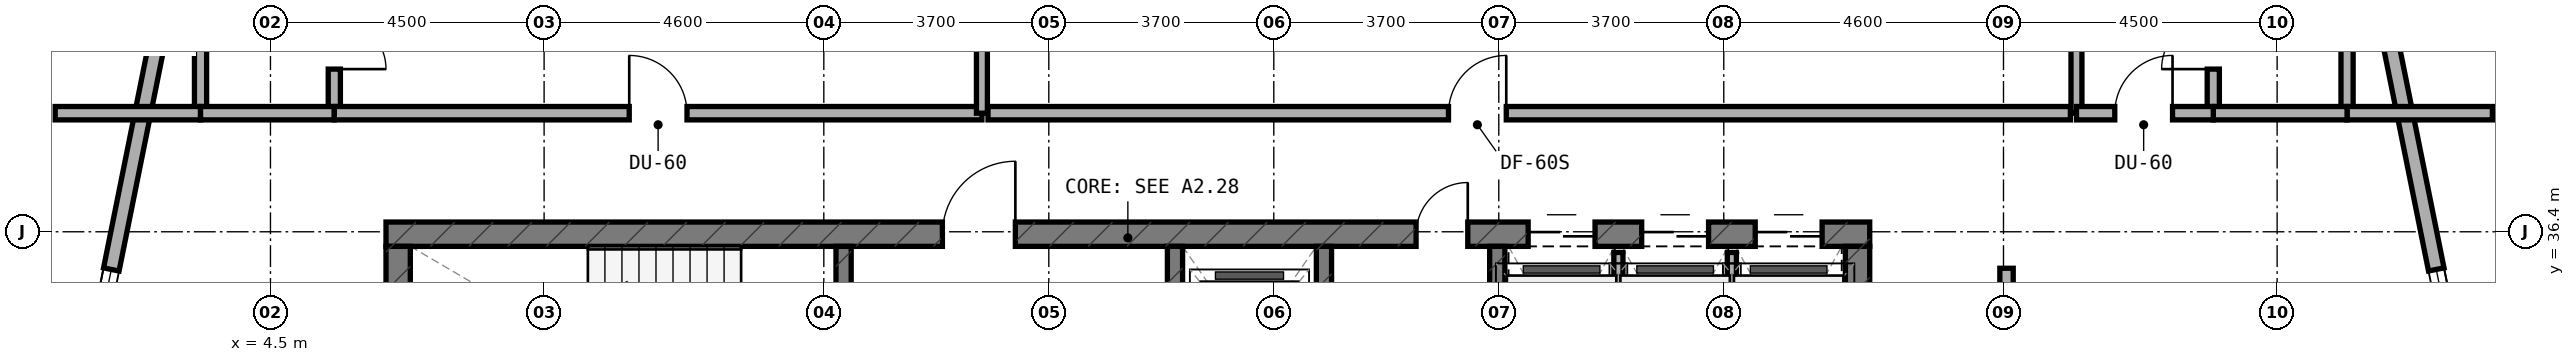
"""IFC4 building model, lengths in metres.
Left out: names, types, materials, properties, quantities, classifications, styles, units other than length and angle.
Written with IfcOpenShell. Run it as: python <this file> out.ifc"""

import sys

from ifc_helpers import new_model, si_unit, direction, frame, frame_2d, origin, place, context, subcontext, project, spatial, rectangle, extrude, element, fill, save


model = new_model("IFC4")
c1 = context("Model", 3, precision=1e-05, world=origin(), true_north=direction((0.0, 1.0)))
c2 = subcontext(c1, "Body", "Model", "MODEL_VIEW")
j1 = project(units=[si_unit("LENGTHUNIT", "METRE"), si_unit("PLANEANGLEUNIT", "RADIAN")], contexts=[c1])
p1 = place(None, origin())
s1 = spatial("IfcSite", under=j1, at=p1, CompositionType="ELEMENT")
p2 = place(p1, origin())
s2 = spatial("IfcBuilding", under=s1, at=p2, CompositionType="ELEMENT")
p3 = place(p2, frame((0.0, 0.0, 124.0)))
s3 = spatial("IfcBuildingStorey", under=s2, at=p3, CompositionType="ELEMENT", Elevation=124.0)
p4 = place(p3, frame((6.4, 36.36, 0.0), z_axis=(0.0, 0.0, 1.0), x_axis=(1.0, 0.0, 0.0)))
e1 = element("IfcWall", 1, at=p4, inside=s3, PredefinedType="SHEAR", context=c2, shape_type="SweptSolid", body=[
    extrude(rectangle(XDim=24.4, YDim=0.4, at=frame_2d((12.2, 0.0))), origin(), (0.0, 0.0, 1.0), 3.5),
])
p5 = place(p4, frame((9.15, 0.0, 0.0)))
e2 = element("IfcOpeningElement", 2, at=p5, cuts=e1, PredefinedType="OPENING", context=c2, shape_type="SweptSolid", body=[
    extrude(rectangle(XDim=1.2, YDim=2.15, at=frame_2d((0.6, 1.075))), frame((0.0, 0.21, 0.0), z_axis=(0.0, -1.0, 0.0), x_axis=(1.0, 0.0, 0.0)), (0.0, 0.0, 1.0), 0.42),
])
p6 = place(p4, frame((16.94, 0.0, 0.0)))
e3 = element("IfcOpeningElement", 3, at=p6, cuts=e1, PredefinedType="OPENING", context=c2, shape_type="SweptSolid", body=[
    extrude(rectangle(XDim=0.85, YDim=2.1, at=frame_2d((0.425, 1.05))), frame((0.0, 0.21, 0.0), z_axis=(0.0, -1.0, 0.0), x_axis=(1.0, 0.0, 0.0)), (0.0, 0.0, 1.0), 0.42),
])
p7 = place(p4, frame((18.783, 0.0, 0.0)))
e4 = element("IfcOpeningElement", 4, at=p7, cuts=e1, PredefinedType="OPENING", context=c2, shape_type="SweptSolid", body=[
    extrude(rectangle(XDim=1.1, YDim=2.15, at=frame_2d((0.55, 1.075))), frame((0.0, 0.21, 0.0), z_axis=(0.0, -1.0, 0.0), x_axis=(1.0, 0.0, 0.0)), (0.0, 0.0, 1.0), 0.42),
])
p8 = place(p4, frame((20.65, 0.0, 0.0)))
e5 = element("IfcOpeningElement", 5, at=p8, cuts=e1, PredefinedType="OPENING", context=c2, shape_type="SweptSolid", body=[
    extrude(rectangle(XDim=1.1, YDim=2.15, at=frame_2d((0.55, 1.075))), frame((0.0, 0.21, 0.0), z_axis=(0.0, -1.0, 0.0), x_axis=(1.0, 0.0, 0.0)), (0.0, 0.0, 1.0), 0.42),
])
p9 = place(p4, frame((22.517, 0.0, 0.0)))
e6 = element("IfcOpeningElement", 6, at=p9, cuts=e1, PredefinedType="OPENING", context=c2, shape_type="SweptSolid", body=[
    extrude(rectangle(XDim=1.1, YDim=2.15, at=frame_2d((0.55, 1.075))), frame((0.0, 0.21, 0.0), z_axis=(0.0, -1.0, 0.0), x_axis=(1.0, 0.0, 0.0)), (0.0, 0.0, 1.0), 0.42),
])
for number, where, z_axis, x_axis in (
    (7, (6.6, 33.0, 0.0), (0.0, 0.0, 1.0), (0.0, 1.0, 0.0)),
    (8, (30.6, 33.0, 0.0), (0.0, 0.0, 1.0), (0.0, 1.0, 0.0)),
):
    element("IfcWall", number, at=place(p3, frame(where, z_axis=z_axis, x_axis=x_axis)), inside=s3, PredefinedType="SHEAR", context=c2, shape_type="SweptSolid", body=[
        extrude(rectangle(XDim=3.16, YDim=0.4, at=frame_2d((1.58, 0.0))), origin(), (0.0, 0.0, 1.0), 3.5),
    ])
p10 = place(p3, frame((13.925, 33.0, 0.0), z_axis=(0.0, 0.0, 1.0), x_axis=(0.0, 1.0, 0.0)))
e9 = element("IfcWall", 9, at=p10, inside=s3, PredefinedType="STANDARD", context=c2, shape_type="SweptSolid", body=[
    extrude(rectangle(XDim=3.16, YDim=0.25, at=frame_2d((1.58, 0.0))), origin(), (0.0, 0.0, 1.0), 3.22),
])
p11 = place(p10, frame((0.98, 0.0, 0.0)))
e10 = element("IfcOpeningElement", 10, at=p11, cuts=e9, PredefinedType="OPENING", context=c2, shape_type="SweptSolid", body=[
    extrude(rectangle(XDim=1.1, YDim=2.15, at=frame_2d((0.55, 1.075))), frame((0.0, 0.135, 0.0), z_axis=(0.0, -1.0, 0.0), x_axis=(1.0, 0.0, 0.0)), (0.0, 0.0, 1.0), 0.27),
])
p12 = place(p3, frame((19.375, 33.0, 0.0), z_axis=(0.0, 0.0, 1.0), x_axis=(0.0, 1.0, 0.0)))
e11 = element("IfcWall", 11, at=p12, inside=s3, PredefinedType="STANDARD", context=c2, shape_type="SweptSolid", body=[
    extrude(rectangle(XDim=3.16, YDim=0.25, at=frame_2d((1.58, 0.0))), origin(), (0.0, 0.0, 1.0), 3.22),
])
p13 = place(p12, frame((0.98, 0.0, 0.0)))
e12 = element("IfcOpeningElement", 12, at=p13, cuts=e11, PredefinedType="OPENING", context=c2, shape_type="SweptSolid", body=[
    extrude(rectangle(XDim=1.1, YDim=2.15, at=frame_2d((0.55, 1.075))), frame((0.0, 0.135, 0.0), z_axis=(0.0, -1.0, 0.0), x_axis=(1.0, 0.0, 0.0)), (0.0, 0.0, 1.0), 0.27),
])
for number, where, z_axis, x_axis in (
    (13, (21.825, 33.0, 0.0), (0.0, 0.0, 1.0), (0.0, 1.0, 0.0)),
    (14, (24.675, 33.0, 0.0), (0.0, 0.0, 1.0), (0.0, 1.0, 0.0)),
):
    element("IfcWall", number, at=place(p3, frame(where, z_axis=z_axis, x_axis=x_axis)), inside=s3, PredefinedType="STANDARD", context=c2, shape_type="SweptSolid", body=[
        extrude(rectangle(XDim=3.16, YDim=0.25, at=frame_2d((1.58, 0.0))), origin(), (0.0, 0.0, 1.0), 3.22),
    ])
p14 = place(p3, frame((41.084, 30.98, 0.0), z_axis=(0.0, 0.0, 1.0), x_axis=(-0.197435082048, 0.980315963543, 0.0)))
e15 = element("IfcWall", 15, at=p14, inside=s3, PredefinedType="STANDARD", context=c2, shape_type="SweptSolid", body=[
    extrude(rectangle(XDim=9.183, YDim=0.26, at=frame_2d((4.591, 0.0))), origin(), (0.0, 0.0, 1.0), 3.22),
])
p15 = place(p14, frame((2.497, 0.0, 0.8)))
e16 = element("IfcOpeningElement", 16, at=p15, cuts=e15, PredefinedType="OPENING", context=c2, shape_type="SweptSolid", body=[
    extrude(rectangle(XDim=2.4, YDim=1.6, at=frame_2d((1.2, 0.8))), frame((0.0, 0.14, 0.0), z_axis=(0.0, -1.0, 0.0), x_axis=(1.0, 0.0, 0.0)), (0.0, 0.0, 1.0), 0.28),
])
p16 = place(p3, frame((2.729, 39.982, 0.0), z_axis=(0.0, 0.0, 1.0), x_axis=(-0.197435082048, -0.980315963543, 0.0)))
e17 = element("IfcWall", 17, at=p16, inside=s3, PredefinedType="STANDARD", context=c2, shape_type="SweptSolid", body=[
    extrude(rectangle(XDim=9.183, YDim=0.26, at=frame_2d((4.591, 0.0))), origin(), (0.0, 0.0, 1.0), 3.22),
])
p17 = place(p16, frame((4.286, 0.0, 0.8)))
e18 = element("IfcOpeningElement", 18, at=p17, cuts=e17, PredefinedType="OPENING", context=c2, shape_type="SweptSolid", body=[
    extrude(rectangle(XDim=2.4, YDim=1.6, at=frame_2d((1.2, 0.8))), frame((0.0, 0.14, 0.0), z_axis=(0.0, -1.0, 0.0), x_axis=(1.0, 0.0, 0.0)), (0.0, 0.0, 1.0), 0.28),
])
p18 = place(p3, frame((26.667, 33.1, 0.0), z_axis=(0.0, 0.0, 1.0), x_axis=(0.0, 1.0, 0.0)))
e19 = element("IfcWall", 19, at=p18, inside=s3, PredefinedType="PARTITIONING", context=c2, shape_type="SweptSolid", body=[
    extrude(rectangle(XDim=2.96, YDim=0.15, at=frame_2d((1.48, 0.0))), origin(), (0.0, 0.0, 1.0), 3.22),
])
p19 = place(p3, frame((28.533, 33.1, 0.0), z_axis=(0.0, 0.0, 1.0), x_axis=(0.0, 1.0, 0.0)))
e20 = element("IfcWall", 20, at=p19, inside=s3, PredefinedType="PARTITIONING", context=c2, shape_type="SweptSolid", body=[
    extrude(rectangle(XDim=2.96, YDim=0.15, at=frame_2d((1.48, 0.0))), origin(), (0.0, 0.0, 1.0), 2.695),
])
p20 = place(p3, frame((5.55, 38.45, 0.0), z_axis=(0.0, 0.0, 1.0), x_axis=(0.0, 1.0, 0.0)))
e21 = element("IfcWall", 21, at=p20, inside=s3, PredefinedType="PLUMBINGWALL", context=c2, shape_type="SweptSolid", body=[
    extrude(rectangle(XDim=2.1, YDim=0.2, at=frame_2d((1.05, 0.0))), origin(), (0.0, 0.0, 1.0), 3.22),
])
p21 = place(p20, frame((0.625, 0.0, 0.0)))
e22 = element("IfcOpeningElement", 22, at=p21, cuts=e21, PredefinedType="OPENING", context=c2, shape_type="SweptSolid", body=[
    extrude(rectangle(XDim=0.85, YDim=2.1, at=frame_2d((0.425, 1.05))), frame((0.0, 0.11, 0.0), z_axis=(0.0, -1.0, 0.0), x_axis=(1.0, 0.0, 0.0)), (0.0, 0.0, 1.0), 0.22),
])
p22 = place(p3, frame((3.35, 38.45, 0.0), z_axis=(0.0, 0.0, 1.0), x_axis=(0.0, 1.0, 0.0)))
e23 = element("IfcWall", 23, at=p22, inside=s3, PredefinedType="PLUMBINGWALL", context=c2, shape_type="SweptSolid", body=[
    extrude(rectangle(XDim=2.1, YDim=0.2, at=frame_2d((1.05, 0.0))), origin(), (0.0, 0.0, 1.0), 3.22),
])
p23 = place(p3, frame((0.96, 38.35, 0.0), z_axis=(0.0, 0.0, 1.0), x_axis=(1.0, 0.0, 0.0)))
e24 = element("IfcWall", 24, at=p23, inside=s3, PredefinedType="SOLIDWALL", context=c2, shape_type="SweptSolid", body=[
    extrude(rectangle(XDim=2.39, YDim=0.22, at=frame_2d((1.195, 0.0))), origin(), (0.0, 0.0, 1.0), 3.22),
])
p24 = place(p3, frame((3.35, 38.35, 0.0), z_axis=(0.0, 0.0, 1.0), x_axis=(1.0, 0.0, 0.0)))
e25 = element("IfcWall", 25, at=p24, inside=s3, PredefinedType="SOLIDWALL", context=c2, shape_type="SweptSolid", body=[
    extrude(rectangle(XDim=2.2, YDim=0.22, at=frame_2d((1.1, 0.0))), origin(), (0.0, 0.0, 1.0), 3.22),
])
p25 = place(p3, frame((5.55, 38.35, 0.0), z_axis=(0.0, 0.0, 1.0), x_axis=(1.0, 0.0, 0.0)))
e26 = element("IfcWall", 26, at=p25, inside=s3, PredefinedType="SOLIDWALL", context=c2, shape_type="SweptSolid", body=[
    extrude(rectangle(XDim=10.65, YDim=0.22, at=frame_2d((5.325, 0.0))), origin(), (0.0, 0.0, 1.0), 2.695),
])
p26 = place(p25, frame((4.85, 0.0, 0.0)))
e27 = element("IfcOpeningElement", 27, at=p26, cuts=e26, PredefinedType="OPENING", context=c2, shape_type="SweptSolid", body=[
    extrude(rectangle(XDim=0.95, YDim=2.1, at=frame_2d((0.475, 1.05))), frame((0.0, 0.12, 0.0), z_axis=(0.0, -1.0, 0.0), x_axis=(1.0, 0.0, 0.0)), (0.0, 0.0, 1.0), 0.24),
])
p27 = place(p3, frame((16.2, 38.35, 0.0), z_axis=(0.0, 0.0, 1.0), x_axis=(0.0, 1.0, 0.0)))
e28 = element("IfcWall", 28, at=p27, inside=s3, PredefinedType="SOLIDWALL", context=c2, shape_type="SweptSolid", body=[
    extrude(rectangle(XDim=6.79, YDim=0.18, at=frame_2d((3.395, 0.0))), origin(), (0.0, 0.0, 1.0), 2.695),
])
p28 = place(p3, frame((16.3, 38.35, 0.0), z_axis=(0.0, 0.0, 1.0), x_axis=(1.0, 0.0, 0.0)))
e29 = element("IfcWall", 29, at=p28, inside=s3, PredefinedType="SOLIDWALL", context=c2, shape_type="SweptSolid", body=[
    extrude(rectangle(XDim=17.8, YDim=0.22, at=frame_2d((8.9, 0.0))), origin(), (0.0, 0.0, 1.0), 2.695),
])
p29 = place(p28, frame((7.573, 0.0, 0.0)))
e30 = element("IfcOpeningElement", 30, at=p29, cuts=e29, PredefinedType="OPENING", context=c2, shape_type="SweptSolid", body=[
    extrude(rectangle(XDim=0.95, YDim=2.1, at=frame_2d((0.475, 1.05))), frame((0.0, 0.12, 0.0), z_axis=(0.0, -1.0, 0.0), x_axis=(1.0, 0.0, 0.0)), (0.0, 0.0, 1.0), 0.24),
])
p30 = place(p3, frame((34.2, 38.35, 0.0), z_axis=(0.0, 0.0, 1.0), x_axis=(0.0, 1.0, 0.0)))
e31 = element("IfcWall", 31, at=p30, inside=s3, PredefinedType="SOLIDWALL", context=c2, shape_type="SweptSolid", body=[
    extrude(rectangle(XDim=5.351, YDim=0.18, at=frame_2d((2.675, 0.0))), origin(), (0.0, 0.0, 1.0), 2.695),
])
p31 = place(p3, frame((36.45, 38.45, 0.0), z_axis=(0.0, 0.0, 1.0), x_axis=(0.0, 1.0, 0.0)))
e32 = element("IfcWall", 32, at=p31, inside=s3, PredefinedType="PLUMBINGWALL", context=c2, shape_type="SweptSolid", body=[
    extrude(rectangle(XDim=2.1, YDim=0.2, at=frame_2d((1.05, 0.0))), origin(), (0.0, 0.0, 1.0), 3.22),
])
p32 = place(p31, frame((0.625, 0.0, 0.0)))
e33 = element("IfcOpeningElement", 33, at=p32, cuts=e32, PredefinedType="OPENING", context=c2, shape_type="SweptSolid", body=[
    extrude(rectangle(XDim=0.85, YDim=2.1, at=frame_2d((0.425, 1.05))), frame((0.0, 0.11, 0.0), z_axis=(0.0, -1.0, 0.0), x_axis=(1.0, 0.0, 0.0)), (0.0, 0.0, 1.0), 0.22),
])
p33 = place(p3, frame((38.65, 38.45, 0.0), z_axis=(0.0, 0.0, 1.0), x_axis=(0.0, 1.0, 0.0)))
e34 = element("IfcWall", 34, at=p33, inside=s3, PredefinedType="PLUMBINGWALL", context=c2, shape_type="SweptSolid", body=[
    extrude(rectangle(XDim=2.1, YDim=0.2, at=frame_2d((1.05, 0.0))), origin(), (0.0, 0.0, 1.0), 3.22),
])
p34 = place(p3, frame((38.65, 38.35, 0.0), z_axis=(0.0, 0.0, 1.0), x_axis=(1.0, 0.0, 0.0)))
e35 = element("IfcWall", 35, at=p34, inside=s3, PredefinedType="SOLIDWALL", context=c2, shape_type="SweptSolid", body=[
    extrude(rectangle(XDim=2.39, YDim=0.22, at=frame_2d((1.195, 0.0))), origin(), (0.0, 0.0, 1.0), 3.22),
])
p35 = place(p3, frame((36.45, 38.35, 0.0), z_axis=(0.0, 0.0, 1.0), x_axis=(1.0, 0.0, 0.0)))
e36 = element("IfcWall", 36, at=p35, inside=s3, PredefinedType="SOLIDWALL", context=c2, shape_type="SweptSolid", body=[
    extrude(rectangle(XDim=2.2, YDim=0.22, at=frame_2d((1.1, 0.0))), origin(), (0.0, 0.0, 1.0), 3.22),
])
p36 = place(p3, frame((34.2, 38.35, 0.0), z_axis=(0.0, 0.0, 1.0), x_axis=(1.0, 0.0, 0.0)))
e37 = element("IfcWall", 37, at=p36, inside=s3, PredefinedType="SOLIDWALL", context=c2, shape_type="SweptSolid", body=[
    extrude(rectangle(XDim=2.25, YDim=0.22, at=frame_2d((1.125, 0.0))), origin(), (0.0, 0.0, 1.0), 2.695),
])
p37 = place(p36, frame((0.63, 0.0, 0.0)))
e38 = element("IfcOpeningElement", 38, at=p37, cuts=e37, PredefinedType="OPENING", context=c2, shape_type="SweptSolid", body=[
    extrude(rectangle(XDim=0.95, YDim=2.1, at=frame_2d((0.475, 1.05))), frame((0.0, 0.12, 0.0), z_axis=(0.0, -1.0, 0.0), x_axis=(1.0, 0.0, 0.0)), (0.0, 0.0, 1.0), 0.24),
])
p38 = place(p3, frame((33.05, 30.593, 0.0), z_axis=(0.0, 0.0, 1.0), x_axis=(0.0, 1.0, 0.0)))
e39 = element("IfcWall", 39, at=p38, inside=s3, PredefinedType="SOLIDWALL", context=c2, shape_type="SweptSolid", body=[
    extrude(rectangle(XDim=5.207, YDim=0.22, at=frame_2d((2.604, 0.0))), origin(), (0.0, 0.0, 1.0), 2.695),
])
p39 = place(p38, frame((2.128, 0.0, 0.0)))
e40 = element("IfcOpeningElement", 40, at=p39, cuts=e39, PredefinedType="OPENING", context=c2, shape_type="SweptSolid", body=[
    extrude(rectangle(XDim=0.95, YDim=2.1, at=frame_2d((0.475, 1.05))), frame((0.0, 0.12, 0.0), z_axis=(0.0, -1.0, 0.0), x_axis=(1.0, 0.0, 0.0)), (0.0, 0.0, 1.0), 0.24),
])
p40 = place(p15, origin())
e41 = element("IfcWindow", 41, at=p40, inside=s3, PartitioningType="SINGLE_PANEL", PredefinedType="WINDOW", context=c2, shape_type="SweptSolid", body=[
    extrude(rectangle(XDim=2.4, YDim=1.6, at=frame_2d((1.2, 0.8))), frame((0.0, 0.03, 0.0), z_axis=(0.0, -1.0, 0.0), x_axis=(1.0, 0.0, 0.0)), (0.0, 0.0, 1.0), 0.06),
])
fill(e16, e41)
p41 = place(p17, origin())
e42 = element("IfcWindow", 42, at=p41, inside=s3, PartitioningType="SINGLE_PANEL", PredefinedType="WINDOW", context=c2, shape_type="SweptSolid", body=[
    extrude(rectangle(XDim=2.4, YDim=1.6, at=frame_2d((1.2, 0.8))), frame((0.0, 0.03, 0.0), z_axis=(0.0, -1.0, 0.0), x_axis=(1.0, 0.0, 0.0)), (0.0, 0.0, 1.0), 0.06),
])
fill(e18, e42)
p42 = place(p5, origin())
e43 = element("IfcDoor", 43, at=p42, inside=s3, OperationType="SINGLE_SWING_RIGHT", PredefinedType="DOOR", context=c2, shape_type="SweptSolid", body=[
    extrude(rectangle(XDim=1.2, YDim=2.15, at=frame_2d((0.6, 1.075))), frame((0.0, 0.025, 0.0), z_axis=(0.0, -1.0, 0.0), x_axis=(1.0, 0.0, 0.0)), (0.0, 0.0, 1.0), 0.05),
])
fill(e2, e43)
p43 = place(p6, origin())
e44 = element("IfcDoor", 44, at=p43, inside=s3, OperationType="SINGLE_SWING_RIGHT", PredefinedType="DOOR", context=c2, shape_type="SweptSolid", body=[
    extrude(rectangle(XDim=0.85, YDim=2.1, at=frame_2d((0.425, 1.05))), frame((0.0, 0.025, 0.0), z_axis=(0.0, -1.0, 0.0), x_axis=(1.0, 0.0, 0.0)), (0.0, 0.0, 1.0), 0.05),
])
fill(e3, e44)
p44 = place(p7, origin())
e45 = element("IfcDoor", 45, at=p44, inside=s3, OperationType="DOUBLE_DOOR_SLIDING", PredefinedType="DOOR", context=c2, shape_type="SweptSolid", body=[
    extrude(rectangle(XDim=1.1, YDim=2.15, at=frame_2d((0.55, 1.075))), frame((0.0, 0.025, 0.0), z_axis=(0.0, -1.0, 0.0), x_axis=(1.0, 0.0, 0.0)), (0.0, 0.0, 1.0), 0.05),
])
fill(e4, e45)
p45 = place(p8, origin())
e46 = element("IfcDoor", 46, at=p45, inside=s3, OperationType="DOUBLE_DOOR_SLIDING", PredefinedType="DOOR", context=c2, shape_type="SweptSolid", body=[
    extrude(rectangle(XDim=1.1, YDim=2.15, at=frame_2d((0.55, 1.075))), frame((0.0, 0.025, 0.0), z_axis=(0.0, -1.0, 0.0), x_axis=(1.0, 0.0, 0.0)), (0.0, 0.0, 1.0), 0.05),
])
fill(e5, e46)
p46 = place(p9, origin())
e47 = element("IfcDoor", 47, at=p46, inside=s3, OperationType="DOUBLE_DOOR_SLIDING", PredefinedType="DOOR", context=c2, shape_type="SweptSolid", body=[
    extrude(rectangle(XDim=1.1, YDim=2.15, at=frame_2d((0.55, 1.075))), frame((0.0, 0.025, 0.0), z_axis=(0.0, -1.0, 0.0), x_axis=(1.0, 0.0, 0.0)), (0.0, 0.0, 1.0), 0.05),
])
fill(e6, e47)
p47 = place(p21, frame((0.85, 0.0, 0.0), z_axis=(0.0, 0.0, 1.0), x_axis=(-1.0, 0.0, 0.0)))
e48 = element("IfcDoor", 48, at=p47, inside=s3, OperationType="SINGLE_SWING_RIGHT", PredefinedType="DOOR", context=c2, shape_type="SweptSolid", body=[
    extrude(rectangle(XDim=0.85, YDim=2.1, at=frame_2d((0.425, 1.05))), frame((0.0, 0.025, 0.0), z_axis=(0.0, -1.0, 0.0), x_axis=(1.0, 0.0, 0.0)), (0.0, 0.0, 1.0), 0.05),
])
fill(e22, e48)
p48 = place(p26, origin())
e49 = element("IfcDoor", 49, at=p48, inside=s3, OperationType="SINGLE_SWING_LEFT", PredefinedType="DOOR", context=c2, shape_type="SweptSolid", body=[
    extrude(rectangle(XDim=0.95, YDim=2.1, at=frame_2d((0.475, 1.05))), frame((0.0, 0.025, 0.0), z_axis=(0.0, -1.0, 0.0), x_axis=(1.0, 0.0, 0.0)), (0.0, 0.0, 1.0), 0.05),
])
fill(e27, e49)
p49 = place(p29, origin())
e50 = element("IfcDoor", 50, at=p49, inside=s3, OperationType="SINGLE_SWING_RIGHT", PredefinedType="DOOR", context=c2, shape_type="SweptSolid", body=[
    extrude(rectangle(XDim=0.95, YDim=2.1, at=frame_2d((0.475, 1.05))), frame((0.0, 0.025, 0.0), z_axis=(0.0, -1.0, 0.0), x_axis=(1.0, 0.0, 0.0)), (0.0, 0.0, 1.0), 0.05),
])
fill(e30, e50)
p50 = place(p32, origin())
e51 = element("IfcDoor", 51, at=p50, inside=s3, OperationType="SINGLE_SWING_LEFT", PredefinedType="DOOR", context=c2, shape_type="SweptSolid", body=[
    extrude(rectangle(XDim=0.85, YDim=2.1, at=frame_2d((0.425, 1.05))), frame((0.0, 0.025, 0.0), z_axis=(0.0, -1.0, 0.0), x_axis=(1.0, 0.0, 0.0)), (0.0, 0.0, 1.0), 0.05),
])
fill(e33, e51)
p51 = place(p37, origin())
e52 = element("IfcDoor", 52, at=p51, inside=s3, OperationType="SINGLE_SWING_RIGHT", PredefinedType="DOOR", context=c2, shape_type="SweptSolid", body=[
    extrude(rectangle(XDim=0.95, YDim=2.1, at=frame_2d((0.475, 1.05))), frame((0.0, 0.025, 0.0), z_axis=(0.0, -1.0, 0.0), x_axis=(1.0, 0.0, 0.0)), (0.0, 0.0, 1.0), 0.05),
])
fill(e38, e52)
save(model, sys.argv[1])
